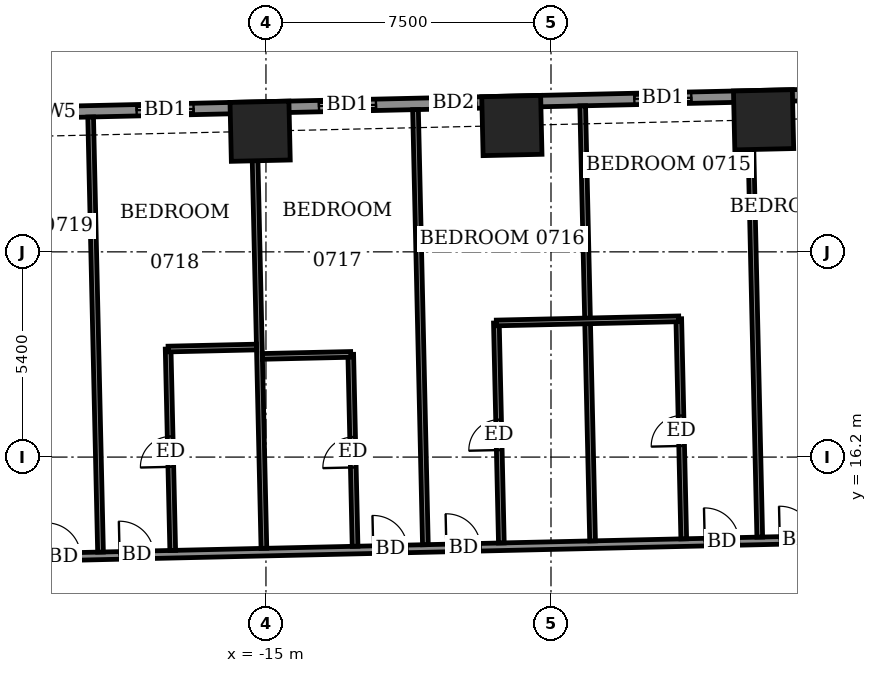
"""IFC4 building model, lengths in metres.
Left out: names, types, materials, properties, quantities, classifications, styles, units other than length and angle.
Written with IfcOpenShell. Run it as: python <this file> out.ifc"""

import sys

from ifc_helpers import new_model, si_unit, direction, frame, frame_2d, origin, origin_2d, place, context, subcontext, project, spatial, rectangle, extrude, element, fill, save


model = new_model("IFC4")
c1 = context("Model", 3, precision=1e-05, world=origin(), true_north=direction((0.0, 1.0)))
c2 = subcontext(c1, "Body", "Model", "MODEL_VIEW")
j1 = project(units=[si_unit("LENGTHUNIT", "METRE"), si_unit("PLANEANGLEUNIT", "RADIAN")], contexts=[c1])
p1 = place(None, origin())
s1 = spatial("IfcSite", under=j1, at=p1, CompositionType="ELEMENT")
p2 = place(p1, origin())
s2 = spatial("IfcBuilding", under=s1, at=p2, CompositionType="ELEMENT")
p3 = place(p2, frame((0.0, 0.0, 34.1)))
s3 = spatial("IfcBuildingStorey", under=s2, at=p3, CompositionType="ELEMENT", Elevation=34.1)
for number, where, z_axis, x_axis in (
    (1, (-1.906, 25.075, -0.55), (0.0, 0.0, 1.0), (-1.0, -0.023, 0.0)),
    (2, (-8.529, 24.924, -0.55), (0.0, 0.0, 1.0), (-1.0, -0.023, 0.0)),
    (3, (-15.154, 24.774, -0.55), (0.0, 0.0, 1.0), (-1.0, -0.023, 0.0)),
):
    element("IfcColumn", number, at=place(p3, frame(where, z_axis=z_axis, x_axis=x_axis)), inside=s3, PredefinedType="COLUMN", context=c2, shape_type="SweptSolid", body=[
        extrude(rectangle(XDim=1.55, YDim=1.55, at=origin_2d()), origin(), (0.0, 0.0, 1.0), 3.6),
    ])
p4 = place(p3, frame((24.423, 26.298, 0.0), z_axis=(0.0, 0.0, 1.0), x_axis=(-0.999742433108, -0.022695097355, 0.0)))
e4 = element("IfcWall", 4, at=p4, inside=s3, PredefinedType="SOLIDWALL", context=c2, shape_type="SweptSolid", body=[
    extrude(rectangle(XDim=52.701, YDim=0.3, at=frame_2d((26.35, 0.0))), origin(), (0.0, 0.0, 1.0), 3.05),
])
p5 = place(p4, frame((2.357, 0.0, 0.0)))
e5 = element("IfcOpeningElement", 5, at=p5, cuts=e4, PredefinedType="OPENING", context=c2, shape_type="SweptSolid", body=[
    extrude(rectangle(XDim=1.5, YDim=2.4, at=frame_2d((0.75, 1.2))), frame((0.0, 0.16, 0.0), z_axis=(0.0, -1.0, 0.0), x_axis=(1.0, 0.0, 0.0)), (0.0, 0.0, 1.0), 0.32),
])
p6 = place(p4, frame((7.475, 0.0, 0.0)))
e6 = element("IfcOpeningElement", 6, at=p6, cuts=e4, PredefinedType="OPENING", context=c2, shape_type="SweptSolid", body=[
    extrude(rectangle(XDim=1.5, YDim=2.4, at=frame_2d((0.75, 1.2))), frame((0.0, 0.16, 0.0), z_axis=(0.0, -1.0, 0.0), x_axis=(1.0, 0.0, 0.0)), (0.0, 0.0, 1.0), 0.32),
])
p7 = place(p4, frame((10.262, 0.0, 0.0)))
e7 = element("IfcOpeningElement", 7, at=p7, cuts=e4, PredefinedType="OPENING", context=c2, shape_type="SweptSolid", body=[
    extrude(rectangle(XDim=1.5, YDim=2.4, at=frame_2d((0.75, 1.2))), frame((0.0, 0.16, 0.0), z_axis=(0.0, -1.0, 0.0), x_axis=(1.0, 0.0, 0.0)), (0.0, 0.0, 1.0), 0.32),
])
p8 = place(p4, frame((15.1, 0.0, 0.0)))
e8 = element("IfcOpeningElement", 8, at=p8, cuts=e4, PredefinedType="OPENING", context=c2, shape_type="SweptSolid", body=[
    extrude(rectangle(XDim=1.5, YDim=2.4, at=frame_2d((0.75, 1.2))), frame((0.0, 0.16, 0.0), z_axis=(0.0, -1.0, 0.0), x_axis=(1.0, 0.0, 0.0)), (0.0, 0.0, 1.0), 0.32),
])
p9 = place(p4, frame((20.7, 0.0, 0.0)))
e9 = element("IfcOpeningElement", 9, at=p9, cuts=e4, PredefinedType="OPENING", context=c2, shape_type="SweptSolid", body=[
    extrude(rectangle(XDim=1.2, YDim=2.4, at=frame_2d((0.6, 1.2))), frame((0.0, 0.16, 0.0), z_axis=(0.0, -1.0, 0.0), x_axis=(1.0, 0.0, 0.0)), (0.0, 0.0, 1.0), 0.32),
])
p10 = place(p4, frame((23.337, 0.0, 0.0)))
e10 = element("IfcOpeningElement", 10, at=p10, cuts=e4, PredefinedType="OPENING", context=c2, shape_type="SweptSolid", body=[
    extrude(rectangle(XDim=1.5, YDim=2.4, at=frame_2d((0.75, 1.2))), frame((0.0, 0.16, 0.0), z_axis=(0.0, -1.0, 0.0), x_axis=(1.0, 0.0, 0.0)), (0.0, 0.0, 1.0), 0.32),
])
p11 = place(p4, frame((28.238, 0.0, 0.0)))
e11 = element("IfcOpeningElement", 11, at=p11, cuts=e4, PredefinedType="OPENING", context=c2, shape_type="SweptSolid", body=[
    extrude(rectangle(XDim=1.5, YDim=2.4, at=frame_2d((0.75, 1.2))), frame((0.0, 0.16, 0.0), z_axis=(0.0, -1.0, 0.0), x_axis=(1.0, 0.0, 0.0)), (0.0, 0.0, 1.0), 0.32),
])
p12 = place(p4, frame((33.9, 0.0, 0.0)))
e12 = element("IfcOpeningElement", 12, at=p12, cuts=e4, PredefinedType="OPENING", context=c2, shape_type="SweptSolid", body=[
    extrude(rectangle(XDim=1.2, YDim=2.4, at=frame_2d((0.6, 1.2))), frame((0.0, 0.16, 0.0), z_axis=(0.0, -1.0, 0.0), x_axis=(1.0, 0.0, 0.0)), (0.0, 0.0, 1.0), 0.32),
])
p13 = place(p4, frame((36.538, 0.0, 0.0)))
e13 = element("IfcOpeningElement", 13, at=p13, cuts=e4, PredefinedType="OPENING", context=c2, shape_type="SweptSolid", body=[
    extrude(rectangle(XDim=1.5, YDim=2.4, at=frame_2d((0.75, 1.2))), frame((0.0, 0.16, 0.0), z_axis=(0.0, -1.0, 0.0), x_axis=(1.0, 0.0, 0.0)), (0.0, 0.0, 1.0), 0.32),
])
p14 = place(p4, frame((41.338, 0.0, 0.0)))
e14 = element("IfcOpeningElement", 14, at=p14, cuts=e4, PredefinedType="OPENING", context=c2, shape_type="SweptSolid", body=[
    extrude(rectangle(XDim=1.5, YDim=2.4, at=frame_2d((0.75, 1.2))), frame((0.0, 0.16, 0.0), z_axis=(0.0, -1.0, 0.0), x_axis=(1.0, 0.0, 0.0)), (0.0, 0.0, 1.0), 0.32),
])
p15 = place(p4, frame((44.4, 0.0, 0.9)))
e15 = element("IfcOpeningElement", 15, at=p15, cuts=e4, PredefinedType="OPENING", context=c2, shape_type="SweptSolid", body=[
    extrude(rectangle(XDim=0.9, YDim=1.5, at=frame_2d((0.45, 0.75))), frame((0.0, 0.16, 0.0), z_axis=(0.0, -1.0, 0.0), x_axis=(1.0, 0.0, 0.0)), (0.0, 0.0, 1.0), 0.32),
])
p16 = place(p4, frame((48.764, 0.0, 0.9)))
e16 = element("IfcOpeningElement", 16, at=p16, cuts=e4, PredefinedType="OPENING", context=c2, shape_type="SweptSolid", body=[
    extrude(rectangle(XDim=2.4, YDim=1.5, at=frame_2d((1.2, 0.75))), frame((0.0, 0.16, 0.0), z_axis=(0.0, -1.0, 0.0), x_axis=(1.0, 0.0, 0.0)), (0.0, 0.0, 1.0), 0.32),
])
p17 = place(p3, frame((-12.25, 26.915, 0.0), z_axis=(0.0, 0.0, 1.0), x_axis=(0.999743094499, 0.022665943652, 0.0)))
e17 = element("IfcWall", 17, at=p17, inside=s3, PredefinedType="USERDEFINED", context=c2, shape_type="SweptSolid", body=[
    extrude(rectangle(XDim=6.0, YDim=0.55, at=frame_2d((3.0, 0.0))), origin(), (0.0, 0.0, 1.0), 0.8),
])
p18 = place(p3, frame((-31.347, 13.329, 0.0), z_axis=(0.0, 0.0, 1.0), x_axis=(0.999742613079, 0.022687168058, 0.0)))
e18 = element("IfcWall", 18, at=p18, inside=s3, PredefinedType="PARTITIONING", context=c2, shape_type="SweptSolid", body=[
    extrude(rectangle(XDim=58.799, YDim=0.2, at=frame_2d((29.399, 0.0))), origin(), (0.0, 0.0, 1.0), 3.05),
])
p19 = place(p18, frame((56.45, 0.0, 0.0)))
e19 = element("IfcOpeningElement", 19, at=p19, cuts=e18, PredefinedType="OPENING", context=c2, shape_type="SweptSolid", body=[
    extrude(rectangle(XDim=1.0, YDim=2.1, at=frame_2d((0.5, 1.05))), frame((0.0, 0.11, 0.0), z_axis=(0.0, -1.0, 0.0), x_axis=(1.0, 0.0, 0.0)), (0.0, 0.0, 1.0), 0.22),
])
p20 = place(p18, frame((51.85, 0.0, 0.0)))
e20 = element("IfcOpeningElement", 20, at=p20, cuts=e18, PredefinedType="OPENING", context=c2, shape_type="SweptSolid", body=[
    extrude(rectangle(XDim=0.9, YDim=2.1, at=frame_2d((0.45, 1.05))), frame((0.0, 0.11, 0.0), z_axis=(0.0, -1.0, 0.0), x_axis=(1.0, 0.0, 0.0)), (0.0, 0.0, 1.0), 0.22),
])
p21 = place(p18, frame((47.1, 0.0, 0.0)))
e21 = element("IfcOpeningElement", 21, at=p21, cuts=e18, PredefinedType="OPENING", context=c2, shape_type="SweptSolid", body=[
    extrude(rectangle(XDim=0.9, YDim=2.1, at=frame_2d((0.45, 1.05))), frame((0.0, 0.11, 0.0), z_axis=(0.0, -1.0, 0.0), x_axis=(1.0, 0.0, 0.0)), (0.0, 0.0, 1.0), 0.22),
])
p22 = place(p18, frame((45.225, 0.0, 0.0)))
e22 = element("IfcOpeningElement", 22, at=p22, cuts=e18, PredefinedType="OPENING", context=c2, shape_type="SweptSolid", body=[
    extrude(rectangle(XDim=0.9, YDim=2.1, at=frame_2d((0.45, 1.05))), frame((0.0, 0.11, 0.0), z_axis=(0.0, -1.0, 0.0), x_axis=(1.0, 0.0, 0.0)), (0.0, 0.0, 1.0), 0.22),
])
p23 = place(p18, frame((38.55, 0.0, 0.0)))
e23 = element("IfcOpeningElement", 23, at=p23, cuts=e18, PredefinedType="OPENING", context=c2, shape_type="SweptSolid", body=[
    extrude(rectangle(XDim=0.9, YDim=2.1, at=frame_2d((0.45, 1.05))), frame((0.0, 0.11, 0.0), z_axis=(0.0, -1.0, 0.0), x_axis=(1.0, 0.0, 0.0)), (0.0, 0.0, 1.0), 0.22),
])
p24 = place(p18, frame((36.625, 0.0, 0.0)))
e24 = element("IfcOpeningElement", 24, at=p24, cuts=e18, PredefinedType="OPENING", context=c2, shape_type="SweptSolid", body=[
    extrude(rectangle(XDim=0.9, YDim=2.1, at=frame_2d((0.45, 1.05))), frame((0.0, 0.11, 0.0), z_axis=(0.0, -1.0, 0.0), x_axis=(1.0, 0.0, 0.0)), (0.0, 0.0, 1.0), 0.22),
])
p25 = place(p18, frame((29.875, 0.0, 0.0)))
e25 = element("IfcOpeningElement", 25, at=p25, cuts=e18, PredefinedType="OPENING", context=c2, shape_type="SweptSolid", body=[
    extrude(rectangle(XDim=0.9, YDim=2.1, at=frame_2d((0.45, 1.05))), frame((0.0, 0.11, 0.0), z_axis=(0.0, -1.0, 0.0), x_axis=(1.0, 0.0, 0.0)), (0.0, 0.0, 1.0), 0.22),
])
p26 = place(p18, frame((27.9, 0.0, 0.0)))
e26 = element("IfcOpeningElement", 26, at=p26, cuts=e18, PredefinedType="OPENING", context=c2, shape_type="SweptSolid", body=[
    extrude(rectangle(XDim=0.9, YDim=2.1, at=frame_2d((0.45, 1.05))), frame((0.0, 0.11, 0.0), z_axis=(0.0, -1.0, 0.0), x_axis=(1.0, 0.0, 0.0)), (0.0, 0.0, 1.0), 0.22),
])
p27 = place(p18, frame((21.1, 0.0, 0.0)))
e27 = element("IfcOpeningElement", 27, at=p27, cuts=e18, PredefinedType="OPENING", context=c2, shape_type="SweptSolid", body=[
    extrude(rectangle(XDim=0.9, YDim=2.1, at=frame_2d((0.45, 1.05))), frame((0.0, 0.11, 0.0), z_axis=(0.0, -1.0, 0.0), x_axis=(1.0, 0.0, 0.0)), (0.0, 0.0, 1.0), 0.22),
])
p28 = place(p18, frame((19.175, 0.0, 0.0)))
e28 = element("IfcOpeningElement", 28, at=p28, cuts=e18, PredefinedType="OPENING", context=c2, shape_type="SweptSolid", body=[
    extrude(rectangle(XDim=0.9, YDim=2.1, at=frame_2d((0.45, 1.05))), frame((0.0, 0.11, 0.0), z_axis=(0.0, -1.0, 0.0), x_axis=(1.0, 0.0, 0.0)), (0.0, 0.0, 1.0), 0.22),
])
p29 = place(p18, frame((12.5, 0.0, 0.0)))
e29 = element("IfcOpeningElement", 29, at=p29, cuts=e18, PredefinedType="OPENING", context=c2, shape_type="SweptSolid", body=[
    extrude(rectangle(XDim=0.9, YDim=2.1, at=frame_2d((0.45, 1.05))), frame((0.0, 0.11, 0.0), z_axis=(0.0, -1.0, 0.0), x_axis=(1.0, 0.0, 0.0)), (0.0, 0.0, 1.0), 0.22),
])
p30 = place(p18, frame((10.575, 0.0, 0.0)))
e30 = element("IfcOpeningElement", 30, at=p30, cuts=e18, PredefinedType="OPENING", context=c2, shape_type="SweptSolid", body=[
    extrude(rectangle(XDim=0.9, YDim=2.1, at=frame_2d((0.45, 1.05))), frame((0.0, 0.11, 0.0), z_axis=(0.0, -1.0, 0.0), x_axis=(1.0, 0.0, 0.0)), (0.0, 0.0, 1.0), 0.22),
])
p31 = place(p18, frame((1.425, 0.0, 0.0)))
e31 = element("IfcOpeningElement", 31, at=p31, cuts=e18, PredefinedType="OPENING", context=c2, shape_type="SweptSolid", body=[
    extrude(rectangle(XDim=1.0, YDim=2.1, at=frame_2d((0.5, 1.05))), frame((0.0, 0.11, 0.0), z_axis=(0.0, -1.0, 0.0), x_axis=(1.0, 0.0, 0.0)), (0.0, 0.0, 1.0), 0.22),
])
p32 = place(p18, frame((6.0, 0.0, 0.0)))
e32 = element("IfcOpeningElement", 32, at=p32, cuts=e18, PredefinedType="OPENING", context=c2, shape_type="SweptSolid", body=[
    extrude(rectangle(XDim=0.9, YDim=2.1, at=frame_2d((0.45, 1.05))), frame((0.0, 0.11, 0.0), z_axis=(0.0, -1.0, 0.0), x_axis=(1.0, 0.0, 0.0)), (0.0, 0.0, 1.0), 0.22),
])
p33 = place(p3, frame((-19.353, 13.701, 0.0), z_axis=(0.0, 0.0, 1.0), x_axis=(-0.022708327922, 0.999742132674, 0.0)))
e33 = element("IfcWall", 33, at=p33, inside=s3, PredefinedType="PARTITIONING", context=c2, shape_type="SweptSolid", body=[
    extrude(rectangle(XDim=11.45, YDim=0.15, at=frame_2d((5.725, 0.0))), origin(), (0.0, 0.0, 1.0), 2.55),
])
p34 = place(p3, frame((-17.453, 13.744, 0.0), z_axis=(0.0, 0.0, 1.0), x_axis=(-0.022845913063, 0.999738998067, 0.0)))
e34 = element("IfcWall", 34, at=p34, inside=s3, PredefinedType="PARTITIONING", context=c2, shape_type="SweptSolid", body=[
    extrude(rectangle(XDim=5.301, YDim=0.15, at=frame_2d((2.65, 0.0))), origin(), (0.0, 0.0, 1.0), 3.05),
])
p35 = place(p34, frame((2.2, 0.0, 0.0)))
e35 = element("IfcOpeningElement", 35, at=p35, cuts=e34, PredefinedType="OPENING", context=c2, shape_type="SweptSolid", body=[
    extrude(rectangle(XDim=0.8, YDim=2.1, at=frame_2d((0.4, 1.05))), frame((0.0, 0.085, 0.0), z_axis=(0.0, -1.0, 0.0), x_axis=(1.0, 0.0, 0.0)), (0.0, 0.0, 1.0), 0.17),
])
p36 = place(p3, frame((-15.054, 13.799, 0.0), z_axis=(0.0, 0.0, 1.0), x_axis=(-0.022708327922, 0.999742132674, 0.0)))
e36 = element("IfcWall", 36, at=p36, inside=s3, PredefinedType="PARTITIONING", context=c2, shape_type="SweptSolid", body=[
    extrude(rectangle(XDim=11.45, YDim=0.15, at=frame_2d((5.725, 0.0))), origin(), (0.0, 0.0, 1.0), 3.05),
])
p37 = place(p3, frame((-12.655, 13.853, 0.0), z_axis=(0.0, 0.0, 1.0), x_axis=(-0.02257535817, 0.999745144126, 0.0)))
e37 = element("IfcWall", 37, at=p37, inside=s3, PredefinedType="PARTITIONING", context=c2, shape_type="SweptSolid", body=[
    extrude(rectangle(XDim=5.05, YDim=0.15, at=frame_2d((2.525, 0.0))), origin(), (0.0, 0.0, 1.0), 3.05),
])
p38 = place(p37, frame((2.075, 0.0, 0.0)))
e38 = element("IfcOpeningElement", 38, at=p38, cuts=e37, PredefinedType="OPENING", context=c2, shape_type="SweptSolid", body=[
    extrude(rectangle(XDim=0.8, YDim=2.1, at=frame_2d((0.4, 1.05))), frame((0.0, 0.085, 0.0), z_axis=(0.0, -1.0, 0.0), x_axis=(1.0, 0.0, 0.0)), (0.0, 0.0, 1.0), 0.17),
])
p39 = place(p3, frame((-10.805, 13.895, 0.0), z_axis=(0.0, 0.0, 1.0), x_axis=(-0.022708327922, 0.999742132674, 0.0)))
e39 = element("IfcWall", 39, at=p39, inside=s3, PredefinedType="PARTITIONING", context=c2, shape_type="SweptSolid", body=[
    extrude(rectangle(XDim=11.45, YDim=0.15, at=frame_2d((5.725, 0.0))), origin(), (0.0, 0.0, 1.0), 2.55),
])
p40 = place(p3, frame((-8.806, 13.941, 0.0), z_axis=(0.0, 0.0, 1.0), x_axis=(-0.022644773889, 0.999743574231, 0.0)))
e40 = element("IfcWall", 40, at=p40, inside=s3, PredefinedType="PARTITIONING", context=c2, shape_type="SweptSolid", body=[
    extrude(rectangle(XDim=5.79, YDim=0.15, at=frame_2d((2.895, 0.0))), origin(), (0.0, 0.0, 1.0), 3.05),
])
p41 = place(p40, frame((2.445, 0.0, 0.0)))
e41 = element("IfcOpeningElement", 41, at=p41, cuts=e40, PredefinedType="OPENING", context=c2, shape_type="SweptSolid", body=[
    extrude(rectangle(XDim=0.8, YDim=2.1, at=frame_2d((0.4, 1.05))), frame((0.0, 0.085, 0.0), z_axis=(0.0, -1.0, 0.0), x_axis=(1.0, 0.0, 0.0)), (0.0, 0.0, 1.0), 0.17),
])
p42 = place(p3, frame((-6.406, 13.995, 0.0), z_axis=(0.0, 0.0, 1.0), x_axis=(-0.022708812003, 0.999742121678, 0.0)))
e42 = element("IfcWall", 42, at=p42, inside=s3, PredefinedType="PARTITIONING", context=c2, shape_type="SweptSolid", body=[
    extrude(rectangle(XDim=11.45, YDim=0.15, at=frame_2d((5.725, 0.0))), origin(), (0.0, 0.0, 1.0), 2.55),
])
p43 = place(p3, frame((-4.007, 14.049, 0.0), z_axis=(0.0, 0.0, 1.0), x_axis=(-0.02259976811, 0.999744592624, 0.0)))
e43 = element("IfcWall", 43, at=p43, inside=s3, PredefinedType="PARTITIONING", context=c2, shape_type="SweptSolid", body=[
    extrude(rectangle(XDim=5.79, YDim=0.15, at=frame_2d((2.895, 0.0))), origin(), (0.0, 0.0, 1.0), 3.05),
])
p44 = place(p43, frame((2.445, 0.0, 0.0)))
e44 = element("IfcOpeningElement", 44, at=p44, cuts=e43, PredefinedType="OPENING", context=c2, shape_type="SweptSolid", body=[
    extrude(rectangle(XDim=0.8, YDim=2.1, at=frame_2d((0.4, 1.05))), frame((0.0, 0.085, 0.0), z_axis=(0.0, -1.0, 0.0), x_axis=(1.0, 0.0, 0.0)), (0.0, 0.0, 1.0), 0.17),
])
p45 = place(p3, frame((-2.007, 14.095, 0.0), z_axis=(0.0, 0.0, 1.0), x_axis=(-0.022708327922, 0.999742132674, 0.0)))
e45 = element("IfcWall", 45, at=p45, inside=s3, PredefinedType="PARTITIONING", context=c2, shape_type="SweptSolid", body=[
    extrude(rectangle(XDim=11.45, YDim=0.15, at=frame_2d((5.725, 0.0))), origin(), (0.0, 0.0, 1.0), 3.05),
])
for number, where, z_axis, x_axis in (
    (46, (-15.094, 18.849, 0.0), (0.0, 0.0, 1.0), (1.0, 0.023, 0.0)),
    (47, (-17.574, 19.043, 0.0), (0.0, 0.0, 1.0), (1.0, 0.023, 0.0)),
):
    element("IfcWall", number, at=place(p3, frame(where, z_axis=z_axis, x_axis=x_axis)), inside=s3, PredefinedType="PARTITIONING", context=c2, shape_type="SweptSolid", body=[
        extrude(rectangle(XDim=2.325, YDim=0.15, at=frame_2d((1.163, 0.0))), origin(), (0.0, 0.0, 1.0), 3.05),
    ])
p46 = place(p3, frame((-8.937, 19.729, 0.0), z_axis=(0.0, 0.0, 1.0), x_axis=(0.999742701292, 0.022683280499, 0.0)))
e48 = element("IfcWall", 48, at=p46, inside=s3, PredefinedType="PARTITIONING", context=c2, shape_type="SweptSolid", body=[
    extrude(rectangle(XDim=4.8, YDim=0.15, at=frame_2d((2.4, 0.0))), origin(), (0.0, 0.0, 1.0), 3.05),
])
p47 = place(p11, origin())
e49 = element("IfcDoor", 49, at=p47, inside=s3, OperationType="SLIDING_TO_LEFT", PredefinedType="DOOR", context=c2, shape_type="SweptSolid", body=[
    extrude(rectangle(XDim=1.5, YDim=2.4, at=frame_2d((0.75, 1.2))), frame((0.0, 0.025, 0.0), z_axis=(0.0, -1.0, 0.0), x_axis=(1.0, 0.0, 0.0)), (0.0, 0.0, 1.0), 0.05),
])
fill(e11, e49)
p48 = place(p12, origin())
e50 = element("IfcDoor", 50, at=p48, inside=s3, OperationType="SLIDING_TO_LEFT", PredefinedType="DOOR", context=c2, shape_type="SweptSolid", body=[
    extrude(rectangle(XDim=1.2, YDim=2.4, at=frame_2d((0.6, 1.2))), frame((0.0, 0.025, 0.0), z_axis=(0.0, -1.0, 0.0), x_axis=(1.0, 0.0, 0.0)), (0.0, 0.0, 1.0), 0.05),
])
fill(e12, e50)
p49 = place(p13, origin())
e51 = element("IfcDoor", 51, at=p49, inside=s3, OperationType="SLIDING_TO_LEFT", PredefinedType="DOOR", context=c2, shape_type="SweptSolid", body=[
    extrude(rectangle(XDim=1.5, YDim=2.4, at=frame_2d((0.75, 1.2))), frame((0.0, 0.025, 0.0), z_axis=(0.0, -1.0, 0.0), x_axis=(1.0, 0.0, 0.0)), (0.0, 0.0, 1.0), 0.05),
])
fill(e13, e51)
p50 = place(p14, origin())
e52 = element("IfcDoor", 52, at=p50, inside=s3, OperationType="SLIDING_TO_LEFT", PredefinedType="DOOR", context=c2, shape_type="SweptSolid", body=[
    extrude(rectangle(XDim=1.5, YDim=2.4, at=frame_2d((0.75, 1.2))), frame((0.0, 0.025, 0.0), z_axis=(0.0, -1.0, 0.0), x_axis=(1.0, 0.0, 0.0)), (0.0, 0.0, 1.0), 0.05),
])
fill(e14, e52)
p51 = place(p15, origin())
e53 = element("IfcWindow", 53, at=p51, inside=s3, PartitioningType="SINGLE_PANEL", PredefinedType="WINDOW", context=c2, shape_type="SweptSolid", body=[
    extrude(rectangle(XDim=0.9, YDim=1.5, at=frame_2d((0.45, 0.75))), frame((0.0, 0.03, 0.0), z_axis=(0.0, -1.0, 0.0), x_axis=(1.0, 0.0, 0.0)), (0.0, 0.0, 1.0), 0.06),
])
fill(e15, e53)
p52 = place(p25, origin())
e54 = element("IfcDoor", 54, at=p52, inside=s3, OperationType="SINGLE_SWING_RIGHT", PredefinedType="DOOR", context=c2, shape_type="SweptSolid", body=[
    extrude(rectangle(XDim=0.9, YDim=2.1, at=frame_2d((0.45, 1.05))), frame((0.0, 0.025, 0.0), z_axis=(0.0, -1.0, 0.0), x_axis=(1.0, 0.0, 0.0)), (0.0, 0.0, 1.0), 0.05),
])
fill(e25, e54)
p53 = place(p26, origin())
e55 = element("IfcDoor", 55, at=p53, inside=s3, OperationType="SINGLE_SWING_LEFT", PredefinedType="DOOR", context=c2, shape_type="SweptSolid", body=[
    extrude(rectangle(XDim=0.9, YDim=2.1, at=frame_2d((0.45, 1.05))), frame((0.0, 0.025, 0.0), z_axis=(0.0, -1.0, 0.0), x_axis=(1.0, 0.0, 0.0)), (0.0, 0.0, 1.0), 0.05),
])
fill(e26, e55)
p54 = place(p44, origin())
e56 = element("IfcDoor", 56, at=p54, inside=s3, OperationType="SINGLE_SWING_LEFT", PredefinedType="DOOR", context=c2, shape_type="SweptSolid", body=[
    extrude(rectangle(XDim=0.8, YDim=2.1, at=frame_2d((0.4, 1.05))), frame((0.0, 0.025, 0.0), z_axis=(0.0, -1.0, 0.0), x_axis=(1.0, 0.0, 0.0)), (0.0, 0.0, 1.0), 0.05),
])
fill(e44, e56)
p55 = place(p27, origin())
e57 = element("IfcDoor", 57, at=p55, inside=s3, OperationType="SINGLE_SWING_RIGHT", PredefinedType="DOOR", context=c2, shape_type="SweptSolid", body=[
    extrude(rectangle(XDim=0.9, YDim=2.1, at=frame_2d((0.45, 1.05))), frame((0.0, 0.025, 0.0), z_axis=(0.0, -1.0, 0.0), x_axis=(1.0, 0.0, 0.0)), (0.0, 0.0, 1.0), 0.05),
])
fill(e27, e57)
p56 = place(p41, origin())
e58 = element("IfcDoor", 58, at=p56, inside=s3, OperationType="SINGLE_SWING_RIGHT", PredefinedType="DOOR", context=c2, shape_type="SweptSolid", body=[
    extrude(rectangle(XDim=0.8, YDim=2.1, at=frame_2d((0.4, 1.05))), frame((0.0, 0.025, 0.0), z_axis=(0.0, -1.0, 0.0), x_axis=(1.0, 0.0, 0.0)), (0.0, 0.0, 1.0), 0.05),
])
fill(e41, e58)
p57 = place(p28, origin())
e59 = element("IfcDoor", 59, at=p57, inside=s3, OperationType="SINGLE_SWING_LEFT", PredefinedType="DOOR", context=c2, shape_type="SweptSolid", body=[
    extrude(rectangle(XDim=0.9, YDim=2.1, at=frame_2d((0.45, 1.05))), frame((0.0, 0.025, 0.0), z_axis=(0.0, -1.0, 0.0), x_axis=(1.0, 0.0, 0.0)), (0.0, 0.0, 1.0), 0.05),
])
fill(e28, e59)
p58 = place(p38, origin())
e60 = element("IfcDoor", 60, at=p58, inside=s3, OperationType="SINGLE_SWING_LEFT", PredefinedType="DOOR", context=c2, shape_type="SweptSolid", body=[
    extrude(rectangle(XDim=0.8, YDim=2.1, at=frame_2d((0.4, 1.05))), frame((0.0, 0.025, 0.0), z_axis=(0.0, -1.0, 0.0), x_axis=(1.0, 0.0, 0.0)), (0.0, 0.0, 1.0), 0.05),
])
fill(e38, e60)
p59 = place(p29, origin())
e61 = element("IfcDoor", 61, at=p59, inside=s3, OperationType="SINGLE_SWING_RIGHT", PredefinedType="DOOR", context=c2, shape_type="SweptSolid", body=[
    extrude(rectangle(XDim=0.9, YDim=2.1, at=frame_2d((0.45, 1.05))), frame((0.0, 0.025, 0.0), z_axis=(0.0, -1.0, 0.0), x_axis=(1.0, 0.0, 0.0)), (0.0, 0.0, 1.0), 0.05),
])
fill(e29, e61)
p60 = place(p35, origin())
e62 = element("IfcDoor", 62, at=p60, inside=s3, OperationType="SINGLE_SWING_RIGHT", PredefinedType="DOOR", context=c2, shape_type="SweptSolid", body=[
    extrude(rectangle(XDim=0.8, YDim=2.1, at=frame_2d((0.4, 1.05))), frame((0.0, 0.025, 0.0), z_axis=(0.0, -1.0, 0.0), x_axis=(1.0, 0.0, 0.0)), (0.0, 0.0, 1.0), 0.05),
])
fill(e35, e62)
p61 = place(p30, origin())
e63 = element("IfcDoor", 63, at=p61, inside=s3, OperationType="SINGLE_SWING_LEFT", PredefinedType="DOOR", context=c2, shape_type="SweptSolid", body=[
    extrude(rectangle(XDim=0.9, YDim=2.1, at=frame_2d((0.45, 1.05))), frame((0.0, 0.025, 0.0), z_axis=(0.0, -1.0, 0.0), x_axis=(1.0, 0.0, 0.0)), (0.0, 0.0, 1.0), 0.05),
])
fill(e30, e63)
save(model, sys.argv[1])
